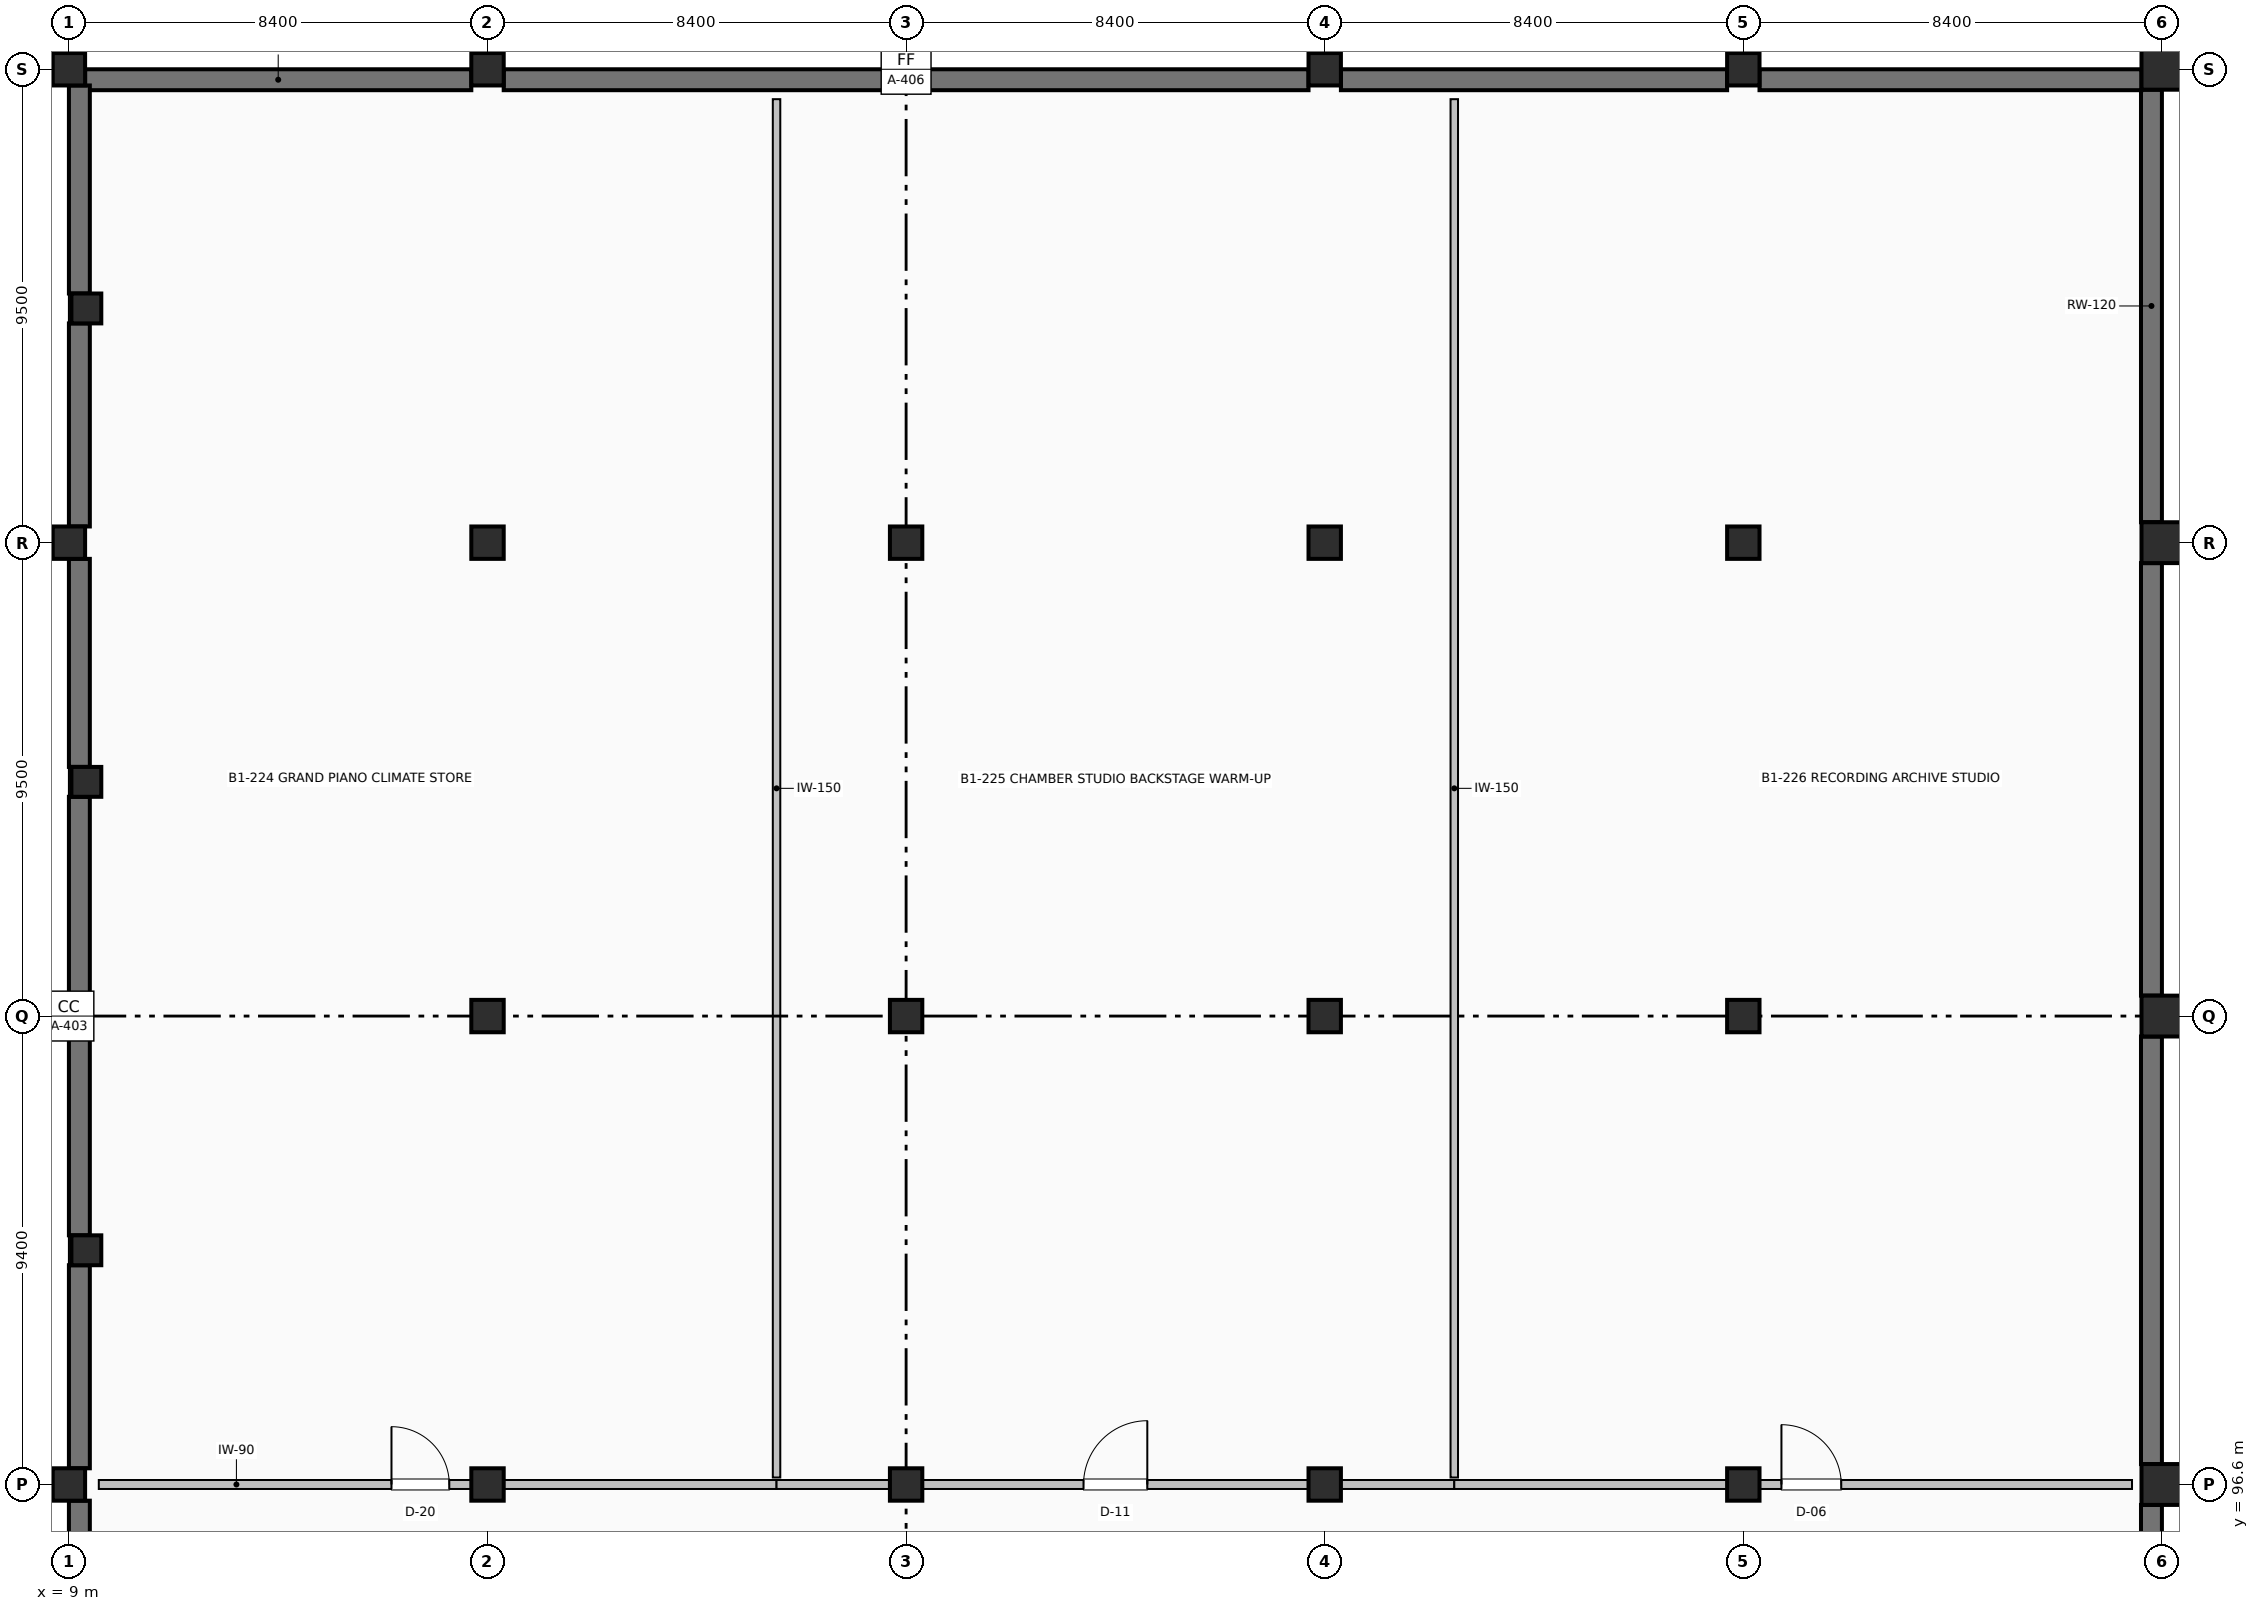
"""IFC4 building model, lengths in metres.
Left out: names, types, materials, properties, quantities, classifications, styles, units other than length and angle.
Written with IfcOpenShell. Run it as: python <this file> out.ifc"""

import sys

from ifc_helpers import new_model, si_unit, direction, frame, frame_2d, origin, origin_2d, place, context, subcontext, project, spatial, rectangle, extrude, element, fill, save


model = new_model("IFC4")
c1 = context("Model", 3, precision=1e-05, world=origin(), true_north=direction((0.0, 1.0)))
c2 = subcontext(c1, "Body", "Model", "MODEL_VIEW")
j1 = project(units=[si_unit("LENGTHUNIT", "METRE"), si_unit("PLANEANGLEUNIT", "RADIAN")], contexts=[c1])
p1 = place(None, origin())
s1 = spatial("IfcSite", under=j1, at=p1, CompositionType="ELEMENT")
p2 = place(p1, origin())
s2 = spatial("IfcBuilding", under=s1, at=p2, CompositionType="ELEMENT")
p3 = place(p2, frame((0.0, 0.0, -4.8)))
s3 = spatial("IfcBuildingStorey", under=s2, at=p3, CompositionType="ELEMENT", Elevation=-4.8)
for number, where, z_axis, x_axis in (
    (1, (9.0, 96.6, 0.0), (0.0, 0.0, 1.0), (1.0, 0.0, 0.0)),
    (2, (9.0, 106.0, 0.0), (0.0, 0.0, 1.0), (1.0, 0.0, 0.0)),
    (3, (9.0, 115.5, 0.0), (0.0, 0.0, 1.0), (1.0, 0.0, 0.0)),
    (4, (9.0, 125.0, 0.0), (0.0, 0.0, 1.0), (1.0, 0.0, 0.0)),
    (5, (17.4, 96.6, 0.0), (0.0, 0.0, 1.0), (1.0, 0.0, 0.0)),
    (6, (17.4, 106.0, 0.0), (0.0, 0.0, 1.0), (1.0, 0.0, 0.0)),
    (7, (17.4, 115.5, 0.0), (0.0, 0.0, 1.0), (1.0, 0.0, 0.0)),
    (8, (17.4, 125.0, 0.0), (0.0, 0.0, 1.0), (1.0, 0.0, 0.0)),
    (9, (25.8, 96.6, 0.0), (0.0, 0.0, 1.0), (1.0, 0.0, 0.0)),
    (10, (25.8, 106.0, 0.0), (0.0, 0.0, 1.0), (1.0, 0.0, 0.0)),
    (11, (25.8, 115.5, 0.0), (0.0, 0.0, 1.0), (1.0, 0.0, 0.0)),
    (12, (25.8, 125.0, 0.0), (0.0, 0.0, 1.0), (1.0, 0.0, 0.0)),
    (13, (34.2, 96.6, 0.0), (0.0, 0.0, 1.0), (1.0, 0.0, 0.0)),
    (14, (34.2, 106.0, 0.0), (0.0, 0.0, 1.0), (1.0, 0.0, 0.0)),
    (15, (34.2, 115.5, 0.0), (0.0, 0.0, 1.0), (1.0, 0.0, 0.0)),
    (16, (34.2, 125.0, 0.0), (0.0, 0.0, 1.0), (1.0, 0.0, 0.0)),
    (17, (42.6, 96.6, 0.0), (0.0, 0.0, 1.0), (1.0, 0.0, 0.0)),
    (18, (42.6, 106.0, 0.0), (0.0, 0.0, 1.0), (1.0, 0.0, 0.0)),
    (19, (42.6, 115.5, 0.0), (0.0, 0.0, 1.0), (1.0, 0.0, 0.0)),
    (20, (42.6, 125.0, 0.0), (0.0, 0.0, 1.0), (1.0, 0.0, 0.0)),
):
    element("IfcColumn", number, at=place(p3, frame(where, z_axis=z_axis, x_axis=x_axis)), inside=s3, PredefinedType="COLUMN", context=c2, shape_type="SweptSolid", body=[
        extrude(rectangle(XDim=0.65, YDim=0.65, at=origin_2d()), origin(), (0.0, 0.0, 1.0), 4.8),
    ])
for number, where, z_axis, x_axis in (
    (21, (51.0, 96.6, 0.0), (0.0, 0.0, 1.0), (1.0, 0.0, 0.0)),
    (22, (51.0, 106.0, 0.0), (0.0, 0.0, 1.0), (1.0, 0.0, 0.0)),
    (23, (51.0, 115.5, 0.0), (0.0, 0.0, 1.0), (1.0, 0.0, 0.0)),
    (24, (51.0, 125.0, 0.0), (0.0, 0.0, 1.0), (1.0, 0.0, 0.0)),
):
    element("IfcColumn", number, at=place(p3, frame(where, z_axis=z_axis, x_axis=x_axis)), inside=s3, PredefinedType="COLUMN", context=c2, shape_type="SweptSolid", body=[
        extrude(rectangle(XDim=0.82, YDim=0.82, at=origin_2d()), origin(), (0.0, 0.0, 1.0), 4.8),
    ])
for number, where, z_axis, x_axis in (
    (25, (9.35, 101.3, 0.0), (0.0, 0.0, 1.0), (1.0, 0.0, 0.0)),
    (26, (9.35, 110.7, 0.0), (0.0, 0.0, 1.0), (1.0, 0.0, 0.0)),
    (27, (9.35, 120.2, 0.0), (0.0, 0.0, 1.0), (1.0, 0.0, 0.0)),
):
    element("IfcColumn", number, at=place(p3, frame(where, z_axis=z_axis, x_axis=x_axis)), inside=s3, PredefinedType="COLUMN", context=c2, shape_type="SweptSolid", body=[
        extrude(rectangle(XDim=0.6, YDim=0.6, at=origin_2d()), origin(), (0.0, 0.0, 1.0), 4.8),
    ])
for number, where, z_axis, x_axis in (
    (28, (50.79, 124.59, 0.0), (0.0, 0.0, 1.0), (0.0, -1.0, 0.0)),
    (29, (50.79, 115.09, 0.0), (0.0, 0.0, 1.0), (0.0, -1.0, 0.0)),
):
    element("IfcWall", number, at=place(p3, frame(where, z_axis=z_axis, x_axis=x_axis)), inside=s3, PredefinedType="SHEAR", context=c2, shape_type="SweptSolid", body=[
        extrude(rectangle(XDim=8.68, YDim=0.42, at=frame_2d((4.34, 0.0))), origin(), (0.0, 0.0, 1.0), 4.5),
    ])
p4 = place(p3, frame((50.79, 105.59, 0.0), z_axis=(0.0, 0.0, 1.0), x_axis=(0.0, -1.0, 0.0)))
e30 = element("IfcWall", 30, at=p4, inside=s3, PredefinedType="SHEAR", context=c2, shape_type="SweptSolid", body=[
    extrude(rectangle(XDim=8.58, YDim=0.42, at=frame_2d((4.29, 0.0))), origin(), (0.0, 0.0, 1.0), 4.5),
])
p5 = place(p3, frame((50.79, 96.19, 0.0), z_axis=(0.0, 0.0, 1.0), x_axis=(0.0, -1.0, 0.0)))
e31 = element("IfcWall", 31, at=p5, inside=s3, PredefinedType="SHEAR", context=c2, shape_type="SweptSolid", body=[
    extrude(rectangle(XDim=8.58, YDim=0.42, at=frame_2d((4.29, 0.0))), origin(), (0.0, 0.0, 1.0), 4.5),
])
for number, where, z_axis, x_axis in (
    (32, (9.325, 124.79, 0.0), (0.0, 0.0, 1.0), (1.0, 0.0, 0.0)),
    (33, (17.725, 124.79, 0.0), (0.0, 0.0, 1.0), (1.0, 0.0, 0.0)),
    (34, (26.125, 124.79, 0.0), (0.0, 0.0, 1.0), (1.0, 0.0, 0.0)),
    (35, (34.525, 124.79, 0.0), (0.0, 0.0, 1.0), (1.0, 0.0, 0.0)),
):
    element("IfcWall", number, at=place(p3, frame(where, z_axis=z_axis, x_axis=x_axis)), inside=s3, PredefinedType="SHEAR", context=c2, shape_type="SweptSolid", body=[
        extrude(rectangle(XDim=7.75, YDim=0.42, at=frame_2d((3.875, 0.0))), origin(), (0.0, 0.0, 1.0), 4.5),
    ])
p6 = place(p3, frame((42.925, 124.79, 0.0), z_axis=(0.0, 0.0, 1.0), x_axis=(1.0, 0.0, 0.0)))
e36 = element("IfcWall", 36, at=p6, inside=s3, PredefinedType="SHEAR", context=c2, shape_type="SweptSolid", body=[
    extrude(rectangle(XDim=7.665, YDim=0.42, at=frame_2d((3.833, 0.0))), origin(), (0.0, 0.0, 1.0), 4.5),
])
for number, where, z_axis, x_axis in (
    (37, (9.21, 92.2, 0.0), (0.0, 0.0, 1.0), (0.0, 1.0, 0.0)),
    (38, (9.21, 96.925, 0.0), (0.0, 0.0, 1.0), (0.0, 1.0, 0.0)),
    (39, (9.21, 101.6, 0.0), (0.0, 0.0, 1.0), (0.0, 1.0, 0.0)),
    (40, (9.21, 106.325, 0.0), (0.0, 0.0, 1.0), (0.0, 1.0, 0.0)),
):
    element("IfcWall", number, at=place(p3, frame(where, z_axis=z_axis, x_axis=x_axis)), inside=s3, PredefinedType="SHEAR", context=c2, shape_type="SweptSolid", body=[
        extrude(rectangle(XDim=4.075, YDim=0.42, at=frame_2d((2.038, 0.0))), origin(), (0.0, 0.0, 1.0), 4.5),
    ])
p7 = place(p3, frame((9.21, 111.0, 0.0), z_axis=(0.0, 0.0, 1.0), x_axis=(0.0, 1.0, 0.0)))
e41 = element("IfcWall", 41, at=p7, inside=s3, PredefinedType="SHEAR", context=c2, shape_type="SweptSolid", body=[
    extrude(rectangle(XDim=4.175, YDim=0.42, at=frame_2d((2.087, 0.0))), origin(), (0.0, 0.0, 1.0), 4.5),
])
p8 = place(p3, frame((9.21, 115.825, 0.0), z_axis=(0.0, 0.0, 1.0), x_axis=(0.0, 1.0, 0.0)))
e42 = element("IfcWall", 42, at=p8, inside=s3, PredefinedType="SHEAR", context=c2, shape_type="SweptSolid", body=[
    extrude(rectangle(XDim=4.075, YDim=0.42, at=frame_2d((2.038, 0.0))), origin(), (0.0, 0.0, 1.0), 4.5),
])
p9 = place(p3, frame((9.21, 120.5, 0.0), z_axis=(0.0, 0.0, 1.0), x_axis=(0.0, 1.0, 0.0)))
e43 = element("IfcWall", 43, at=p9, inside=s3, PredefinedType="SHEAR", context=c2, shape_type="SweptSolid", body=[
    extrude(rectangle(XDim=4.175, YDim=0.42, at=frame_2d((2.087, 0.0))), origin(), (0.0, 0.0, 1.0), 4.5),
])
p10 = place(p3, frame((9.6, 96.6, 0.0), z_axis=(0.0, 0.0, 1.0), x_axis=(1.0, 0.0, 0.0)))
e44 = element("IfcWall", 44, at=p10, inside=s3, PredefinedType="PARTITIONING", context=c2, shape_type="SweptSolid", body=[
    extrude(rectangle(XDim=7.475, YDim=0.18, at=frame_2d((3.737, 0.0))), origin(), (0.0, 0.0, 1.0), 3.642),
])
p11 = place(p10, frame((5.873, 0.0, 0.0)))
e45 = element("IfcOpeningElement", 45, at=p11, cuts=e44, PredefinedType="OPENING", context=c2, shape_type="SweptSolid", body=[
    extrude(rectangle(XDim=1.16, YDim=2.1, at=frame_2d((0.58, 1.05))), frame((0.0, 0.1, 0.0), z_axis=(0.0, -1.0, 0.0), x_axis=(1.0, 0.0, 0.0)), (0.0, 0.0, 1.0), 0.2),
])
p12 = place(p3, frame((17.725, 96.6, 0.0), z_axis=(0.0, 0.0, 1.0), x_axis=(1.0, 0.0, 0.0)))
e46 = element("IfcWall", 46, at=p12, inside=s3, PredefinedType="PARTITIONING", context=c2, shape_type="SweptSolid", body=[
    extrude(rectangle(XDim=5.475, YDim=0.18, at=frame_2d((2.737, 0.0))), origin(), (0.0, 0.0, 1.0), 3.642),
])
p13 = place(p3, frame((23.2, 96.74, 0.0), z_axis=(0.0, 0.0, 1.0), x_axis=(0.0, 1.0, 0.0)))
e47 = element("IfcWall", 47, at=p13, inside=s3, PredefinedType="PARTITIONING", context=c2, shape_type="SweptSolid", body=[
    extrude(rectangle(XDim=27.66, YDim=0.15, at=frame_2d((13.83, 0.0))), origin(), (0.0, 0.0, 1.0), 4.492),
])
p14 = place(p3, frame((23.2, 96.6, 0.0), z_axis=(0.0, 0.0, 1.0), x_axis=(1.0, 0.0, 0.0)))
e48 = element("IfcWall", 48, at=p14, inside=s3, PredefinedType="PARTITIONING", context=c2, shape_type="SweptSolid", body=[
    extrude(rectangle(XDim=2.275, YDim=0.18, at=frame_2d((1.138, 0.0))), origin(), (0.0, 0.0, 1.0), 3.642),
])
p15 = place(p3, frame((26.125, 96.6, 0.0), z_axis=(0.0, 0.0, 1.0), x_axis=(1.0, 0.0, 0.0)))
e49 = element("IfcWall", 49, at=p15, inside=s3, PredefinedType="PARTITIONING", context=c2, shape_type="SweptSolid", body=[
    extrude(rectangle(XDim=7.75, YDim=0.18, at=frame_2d((3.875, 0.0))), origin(), (0.0, 0.0, 1.0), 3.642),
])
p16 = place(p15, frame((3.235, 0.0, 0.0)))
e50 = element("IfcOpeningElement", 50, at=p16, cuts=e49, PredefinedType="OPENING", context=c2, shape_type="SweptSolid", body=[
    extrude(rectangle(XDim=1.28, YDim=2.14, at=frame_2d((0.64, 1.07))), frame((0.0, 0.1, 0.0), z_axis=(0.0, -1.0, 0.0), x_axis=(1.0, 0.0, 0.0)), (0.0, 0.0, 1.0), 0.2),
])
p17 = place(p3, frame((34.525, 96.6, 0.0), z_axis=(0.0, 0.0, 1.0), x_axis=(1.0, 0.0, 0.0)))
e51 = element("IfcWall", 51, at=p17, inside=s3, PredefinedType="PARTITIONING", context=c2, shape_type="SweptSolid", body=[
    extrude(rectangle(XDim=2.275, YDim=0.18, at=frame_2d((1.138, 0.0))), origin(), (0.0, 0.0, 1.0), 3.642),
])
p18 = place(p3, frame((36.8, 96.74, 0.0), z_axis=(0.0, 0.0, 1.0), x_axis=(0.0, 1.0, 0.0)))
e52 = element("IfcWall", 52, at=p18, inside=s3, PredefinedType="PARTITIONING", context=c2, shape_type="SweptSolid", body=[
    extrude(rectangle(XDim=27.66, YDim=0.15, at=frame_2d((13.83, 0.0))), origin(), (0.0, 0.0, 1.0), 4.492),
])
p19 = place(p3, frame((36.8, 96.6, 0.0), z_axis=(0.0, 0.0, 1.0), x_axis=(1.0, 0.0, 0.0)))
e53 = element("IfcWall", 53, at=p19, inside=s3, PredefinedType="PARTITIONING", context=c2, shape_type="SweptSolid", body=[
    extrude(rectangle(XDim=5.475, YDim=0.18, at=frame_2d((2.737, 0.0))), origin(), (0.0, 0.0, 1.0), 3.642),
])
p20 = place(p3, frame((42.925, 96.6, 0.0), z_axis=(0.0, 0.0, 1.0), x_axis=(1.0, 0.0, 0.0)))
e54 = element("IfcWall", 54, at=p20, inside=s3, PredefinedType="PARTITIONING", context=c2, shape_type="SweptSolid", body=[
    extrude(rectangle(XDim=7.475, YDim=0.18, at=frame_2d((3.737, 0.0))), origin(), (0.0, 0.0, 1.0), 4.492),
])
p21 = place(p20, frame((0.44, 0.0, 0.0)))
e55 = element("IfcOpeningElement", 55, at=p21, cuts=e54, PredefinedType="OPENING", context=c2, shape_type="SweptSolid", body=[
    extrude(rectangle(XDim=1.2, YDim=2.1, at=frame_2d((0.6, 1.05))), frame((0.0, 0.1, 0.0), z_axis=(0.0, -1.0, 0.0), x_axis=(1.0, 0.0, 0.0)), (0.0, 0.0, 1.0), 0.2),
])
p22 = place(p11, origin())
e56 = element("IfcDoor", 56, at=p22, inside=s3, OperationType="SINGLE_SWING_LEFT", PredefinedType="DOOR", context=c2, shape_type="SweptSolid", body=[
    extrude(rectangle(XDim=1.16, YDim=2.1, at=frame_2d((0.58, 1.05))), frame((0.0, 0.025, 0.0), z_axis=(0.0, -1.0, 0.0), x_axis=(1.0, 0.0, 0.0)), (0.0, 0.0, 1.0), 0.05),
])
fill(e45, e56)
p23 = place(p16, origin())
e57 = element("IfcDoor", 57, at=p23, inside=s3, OperationType="SINGLE_SWING_RIGHT", PredefinedType="DOOR", context=c2, shape_type="SweptSolid", body=[
    extrude(rectangle(XDim=1.28, YDim=2.14, at=frame_2d((0.64, 1.07))), frame((0.0, 0.025, 0.0), z_axis=(0.0, -1.0, 0.0), x_axis=(1.0, 0.0, 0.0)), (0.0, 0.0, 1.0), 0.05),
])
fill(e50, e57)
p24 = place(p21, origin())
e58 = element("IfcDoor", 58, at=p24, inside=s3, OperationType="SINGLE_SWING_LEFT", PredefinedType="DOOR", context=c2, shape_type="SweptSolid", body=[
    extrude(rectangle(XDim=1.2, YDim=2.1, at=frame_2d((0.6, 1.05))), frame((0.0, 0.025, 0.0), z_axis=(0.0, -1.0, 0.0), x_axis=(1.0, 0.0, 0.0)), (0.0, 0.0, 1.0), 0.05),
])
fill(e55, e58)
save(model, sys.argv[1])
